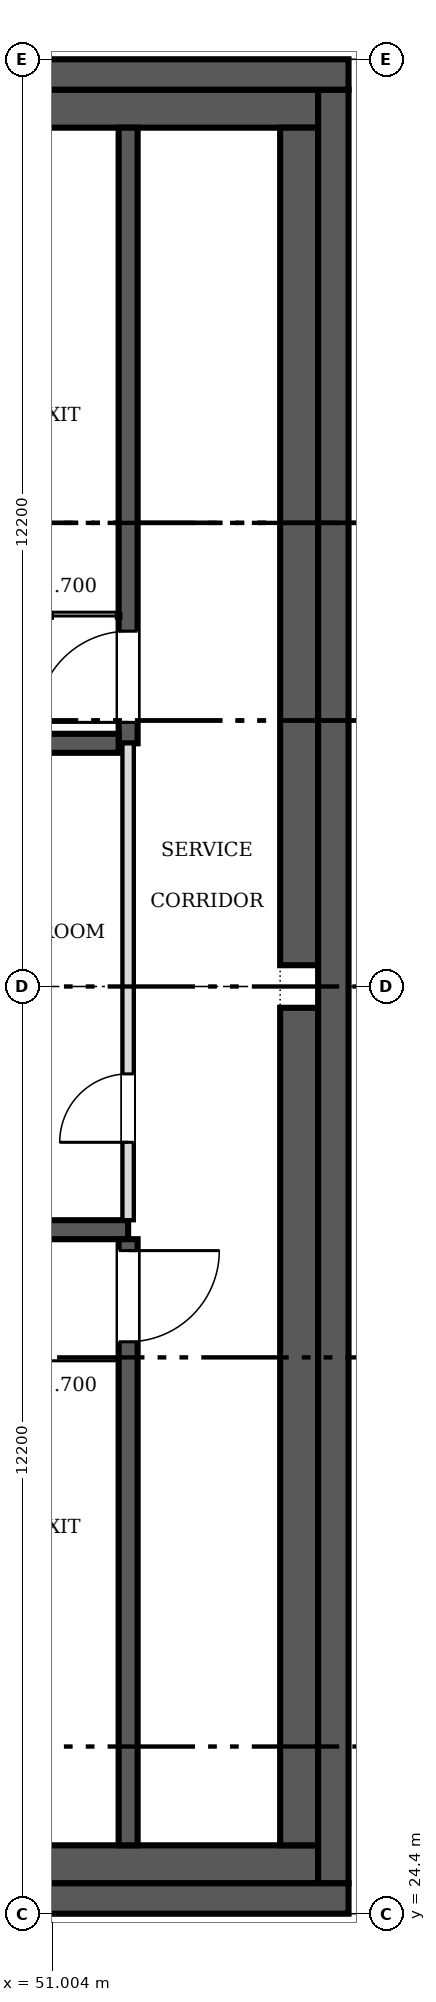
"""IFC4 building model, lengths in metres.
Left out: names, types, materials, properties, quantities, classifications, styles, units other than length and angle.
Written with IfcOpenShell. Run it as: python <this file> out.ifc"""

import sys

from ifc_helpers import new_model, si_unit, direction, frame, frame_2d, origin, place, context, subcontext, project, spatial, rectangle, extrude, source, transform, mapped, element, fill, save


model = new_model("IFC4")
c1 = context("Model", 3, precision=1e-05, world=origin(), true_north=direction((0.0, 1.0)))
c2 = subcontext(c1, "Body", "Model", "MODEL_VIEW")
j1 = project(units=[si_unit("LENGTHUNIT", "METRE"), si_unit("PLANEANGLEUNIT", "RADIAN")], contexts=[c1])
p1 = place(None, origin())
s1 = spatial("IfcSite", under=j1, at=p1, CompositionType="ELEMENT")
p2 = place(p1, origin())
s2 = spatial("IfcBuilding", under=s1, at=p2, CompositionType="ELEMENT")
p3 = place(p2, frame((0.0, 0.0, 265.7)))
s3 = spatial("IfcBuildingStorey", under=s2, at=p3, CompositionType="ELEMENT", Elevation=265.7)
for number, where, z_axis, x_axis in (
    (1, (54.9, 24.6, 0.0), (0.0, 0.0, 1.0), (-1.0, 0.0, 0.0)),
    (2, (30.5, 48.6, 0.0), (0.0, 0.0, 1.0), (1.0, 0.0, 0.0)),
):
    element("IfcWall", number, at=place(p3, frame(where, z_axis=z_axis, x_axis=x_axis)), inside=s3, PredefinedType="SHEAR", context=c2, shape_type="SweptSolid", body=[
        extrude(rectangle(XDim=24.4, YDim=0.4, at=frame_2d((12.2, 0.0))), origin(), (0.0, 0.0, 1.0), 4.2),
    ])
p4 = place(p3, frame((54.7, 48.4, 0.0), z_axis=(0.0, 0.0, 1.0), x_axis=(0.0, -1.0, 0.0)))
e3 = element("IfcWall", 3, at=p4, inside=s3, PredefinedType="SHEAR", context=c2, shape_type="SweptSolid", body=[
    extrude(rectangle(XDim=23.6, YDim=0.4, at=frame_2d((11.8, 0.0))), origin(), (0.0, 0.0, 1.0), 4.2),
])
for number, where, z_axis, x_axis in (
    (4, (30.9, 25.05, 0.0), (0.0, 0.0, 1.0), (1.0, 0.0, 0.0)),
    (5, (30.9, 48.15, 0.0), (0.0, 0.0, 1.0), (1.0, 0.0, 0.0)),
):
    element("IfcWall", number, at=place(p3, frame(where, z_axis=z_axis, x_axis=x_axis)), inside=s3, PredefinedType="SOLIDWALL", context=c2, shape_type="SweptSolid", body=[
        extrude(rectangle(XDim=23.6, YDim=0.5, at=frame_2d((11.8, 0.0))), origin(), (0.0, 0.0, 1.0), 4.2),
    ])
for number, where, z_axis, x_axis in (
    (6, (54.25, 25.3, 0.0), (0.0, 0.0, 1.0), (0.0, 1.0, 0.0)),
    (7, (54.25, 36.88, 0.0), (0.0, 0.0, 1.0), (0.0, 1.0, 0.0)),
):
    element("IfcWall", number, at=place(p3, frame(where, z_axis=z_axis, x_axis=x_axis)), inside=s3, PredefinedType="SOLIDWALL", context=c2, shape_type="SweptSolid", body=[
        extrude(rectangle(XDim=11.02, YDim=0.5, at=frame_2d((5.51, 0.0))), origin(), (0.0, 0.0, 1.0), 4.2),
    ])
p5 = place(p3, frame((48.475, 33.4, 0.0), z_axis=(0.0, 0.0, 1.0), x_axis=(1.0, 0.0, 0.0)))
e8 = element("IfcWall", 8, at=p5, inside=s3, PredefinedType="SOLIDWALL", context=c2, shape_type="SweptSolid", body=[
    extrude(rectangle(XDim=3.525, YDim=0.25, at=frame_2d((1.762, 0.0))), origin(), (0.0, 0.0, 1.0), 4.2),
])
p6 = place(p3, frame((52.0, 25.3, 0.0), z_axis=(0.0, 0.0, 1.0), x_axis=(0.0, 1.0, 0.0)))
e9 = element("IfcWall", 9, at=p6, inside=s3, PredefinedType="SOLIDWALL", context=c2, shape_type="SweptSolid", body=[
    extrude(rectangle(XDim=7.975, YDim=0.25, at=frame_2d((3.987, 0.0))), origin(), (0.0, 0.0, 1.0), 4.2),
])
m1 = source(origin(), c2, "Body", "SweptSolid", [
    extrude(rectangle(XDim=1.2, YDim=2.1, at=frame_2d((0.6, 1.05))), frame((0.0, 0.135, 0.0), z_axis=(0.0, -1.0, 0.0), x_axis=(1.0, 0.0, 0.0)), (0.0, 0.0, 1.0), 0.27),
])
p7 = place(p6, frame((6.625, 0.0, 0.0)))
e10 = element("IfcOpeningElement", 10, at=p7, cuts=e9, PredefinedType="OPENING", context=c2, shape_type="MappedRepresentation", body=[
    mapped(m1, transform((0.0, 0.0, 0.0), scale=1.0)),
])
p8 = place(p3, frame((52.0, 39.8, 0.0), z_axis=(0.0, 0.0, 1.0), x_axis=(0.0, 1.0, 0.0)))
e11 = element("IfcWall", 11, at=p8, inside=s3, PredefinedType="SOLIDWALL", context=c2, shape_type="SweptSolid", body=[
    extrude(rectangle(XDim=8.1, YDim=0.25, at=frame_2d((4.05, 0.0))), origin(), (0.0, 0.0, 1.0), 4.2),
])
p9 = place(p8, frame((0.275, 0.0, 0.0)))
e12 = element("IfcOpeningElement", 12, at=p9, cuts=e11, PredefinedType="OPENING", context=c2, shape_type="MappedRepresentation", body=[
    mapped(m1, transform((0.0, 0.0, 0.0), scale=1.0)),
])
p10 = place(p3, frame((48.475, 39.8, 0.0), z_axis=(0.0, 0.0, 1.0), x_axis=(1.0, 0.0, 0.0)))
e13 = element("IfcWall", 13, at=p10, inside=s3, PredefinedType="SOLIDWALL", context=c2, shape_type="SweptSolid", body=[
    extrude(rectangle(XDim=3.4, YDim=0.25, at=frame_2d((1.7, 0.0))), origin(), (0.0, 0.0, 1.0), 4.2),
])
p11 = place(p3, frame((52.0, 33.525, 0.0), z_axis=(0.0, 0.0, 1.0), x_axis=(0.0, 1.0, 0.0)))
e14 = element("IfcWall", 14, at=p11, inside=s3, PredefinedType="PARTITIONING", context=c2, shape_type="SweptSolid", body=[
    extrude(rectangle(XDim=6.275, YDim=0.15, at=frame_2d((3.138, 0.0))), origin(), (0.0, 0.0, 1.0), 4.2),
])
m2 = source(origin(), c2, "Body", "SweptSolid", [
    extrude(rectangle(XDim=0.9, YDim=2.1, at=frame_2d((0.45, 1.05))), frame((0.0, 0.085, 0.0), z_axis=(0.0, -1.0, 0.0), x_axis=(1.0, 0.0, 0.0)), (0.0, 0.0, 1.0), 0.17),
])
p12 = place(p11, frame((1.025, 0.0, 0.0)))
e15 = element("IfcOpeningElement", 15, at=p12, cuts=e14, PredefinedType="OPENING", context=c2, shape_type="MappedRepresentation", body=[
    mapped(m2, transform((0.0, 0.0, 0.0), scale=1.0)),
])
m3 = source(origin(), c2, "Body", "SweptSolid", [
    extrude(rectangle(XDim=1.2, YDim=2.1, at=frame_2d((0.6, 1.05))), frame((0.0, 0.025, 0.0), z_axis=(0.0, -1.0, 0.0), x_axis=(1.0, 0.0, 0.0)), (0.0, 0.0, 1.0), 0.05),
])
p13 = place(p7, origin())
e16 = element("IfcDoor", 16, at=p13, inside=s3, OperationType="SINGLE_SWING_RIGHT", PredefinedType="DOOR", context=c2, shape_type="MappedRepresentation", body=[
    mapped(m3, transform((0.0, 0.0, 0.0), scale=1.0)),
])
fill(e10, e16)
p14 = place(p9, origin())
e17 = element("IfcDoor", 17, at=p14, inside=s3, OperationType="SINGLE_SWING_LEFT", PredefinedType="DOOR", context=c2, shape_type="MappedRepresentation", body=[
    mapped(m3, transform((0.0, 0.0, 0.0), scale=1.0)),
])
fill(e12, e17)
m4 = source(origin(), c2, "Body", "SweptSolid", [
    extrude(rectangle(XDim=0.9, YDim=2.1, at=frame_2d((0.45, 1.05))), frame((0.0, 0.025, 0.0), z_axis=(0.0, -1.0, 0.0), x_axis=(1.0, 0.0, 0.0)), (0.0, 0.0, 1.0), 0.05),
])
p15 = place(p12, origin())
e18 = element("IfcDoor", 18, at=p15, inside=s3, OperationType="SINGLE_SWING_LEFT", PredefinedType="DOOR", context=c2, shape_type="MappedRepresentation", body=[
    mapped(m4, transform((0.0, 0.0, 0.0), scale=1.0)),
])
fill(e15, e18)
save(model, sys.argv[1])
